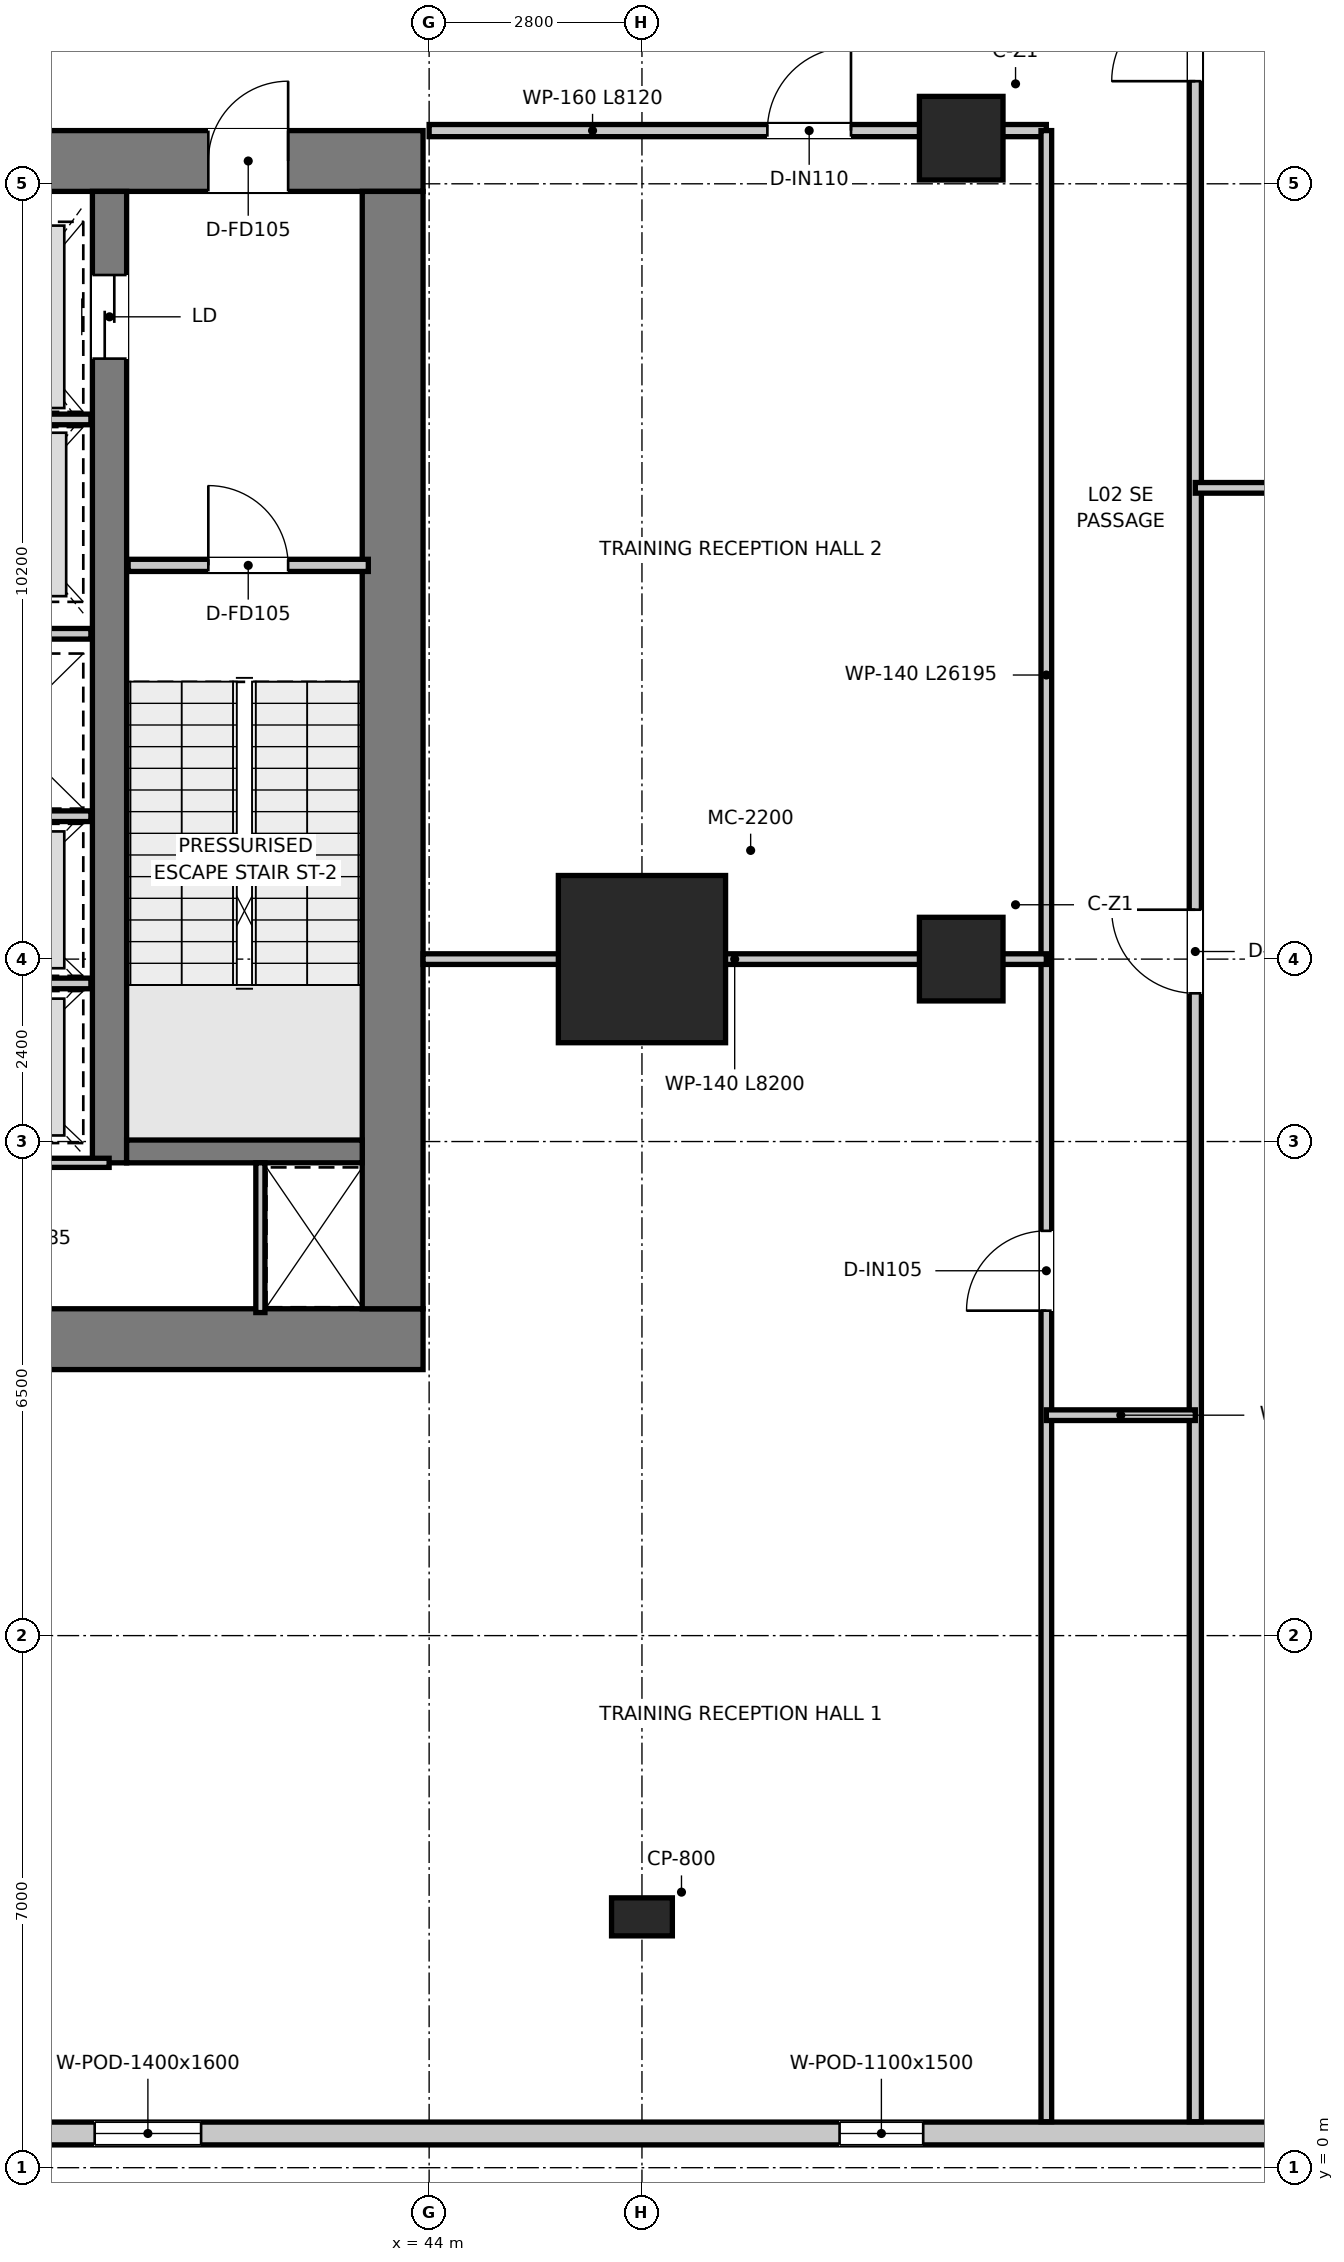
"""IFC4 building model, lengths in metres.
Left out: names, types, materials, properties, quantities, classifications, styles, units other than length and angle.
Written with IfcOpenShell. Run it as: python <this file> out.ifc"""

import sys

from ifc_helpers import new_model, si_unit, direction, frame, frame_2d, origin, origin_2d, place, context, subcontext, project, spatial, rectangle, extrude, source, transform, mapped, element, fill, save


model = new_model("IFC4")
c1 = context("Model", 3, precision=1e-05, world=origin(), true_north=direction((0.0, 1.0)))
c2 = subcontext(c1, "Body", "Model", "MODEL_VIEW")
j1 = project(units=[si_unit("LENGTHUNIT", "METRE"), si_unit("PLANEANGLEUNIT", "RADIAN")], contexts=[c1])
p1 = place(None, origin())
s1 = spatial("IfcSite", under=j1, at=p1, CompositionType="ELEMENT")
p2 = place(p1, origin())
s2 = spatial("IfcBuilding", under=s1, at=p2, CompositionType="ELEMENT")
p3 = place(p2, frame((0.0, 0.0, 10.4)))
s3 = spatial("IfcBuildingStorey", under=s2, at=p3, CompositionType="ELEMENT", Elevation=10.4)
p4 = place(p3, frame((28.08, 10.9, 0.0), z_axis=(0.0, 0.0, 1.0), x_axis=(1.0, 0.0, 0.0)))
e1 = element("IfcWall", 1, at=p4, inside=s3, PredefinedType="SHEAR", context=c2, shape_type="SweptSolid", body=[
    extrude(rectangle(XDim=15.84, YDim=0.8, at=frame_2d((7.92, 0.0))), origin(), (0.0, 0.0, 1.0), 5.0),
])
p5 = place(p3, frame((28.08, 26.4, 0.0), z_axis=(0.0, 0.0, 1.0), x_axis=(1.0, 0.0, 0.0)))
e2 = element("IfcWall", 2, at=p5, inside=s3, PredefinedType="SHEAR", context=c2, shape_type="SweptSolid", body=[
    extrude(rectangle(XDim=15.84, YDim=0.8, at=frame_2d((7.92, 0.0))), origin(), (0.0, 0.0, 1.0), 5.0),
])
p6 = place(p5, frame((7.22, 0.0, 0.0)))
e3 = element("IfcOpeningElement", 3, at=p6, cuts=e2, PredefinedType="OPENING", context=c2, shape_type="SweptSolid", body=[
    extrude(rectangle(XDim=1.4, YDim=2.2, at=frame_2d((0.7, 1.1))), frame((0.0, 0.41, 0.0), z_axis=(0.0, -1.0, 0.0), x_axis=(1.0, 0.0, 0.0)), (0.0, 0.0, 1.0), 0.82),
])
p7 = place(p5, frame((1.775, 0.0, 0.0)))
e4 = element("IfcOpeningElement", 4, at=p7, cuts=e2, PredefinedType="OPENING", context=c2, shape_type="SweptSolid", body=[
    extrude(rectangle(XDim=1.05, YDim=2.1, at=frame_2d((0.525, 1.05))), frame((0.0, 0.41, 0.0), z_axis=(0.0, -1.0, 0.0), x_axis=(1.0, 0.0, 0.0)), (0.0, 0.0, 1.0), 0.82),
])
p8 = place(p5, frame((13.015, 0.0, 0.0)))
e5 = element("IfcOpeningElement", 5, at=p8, cuts=e2, PredefinedType="OPENING", context=c2, shape_type="SweptSolid", body=[
    extrude(rectangle(XDim=1.05, YDim=2.1, at=frame_2d((0.525, 1.05))), frame((0.0, 0.41, 0.0), z_axis=(0.0, -1.0, 0.0), x_axis=(1.0, 0.0, 0.0)), (0.0, 0.0, 1.0), 0.82),
])
p9 = place(p3, frame((43.52, 11.3, 0.0), z_axis=(0.0, 0.0, 1.0), x_axis=(0.0, 1.0, 0.0)))
e6 = element("IfcWall", 6, at=p9, inside=s3, PredefinedType="SHEAR", context=c2, shape_type="SweptSolid", body=[
    extrude(rectangle(XDim=14.7, YDim=0.8, at=frame_2d((7.35, 0.0))), origin(), (0.0, 0.0, 1.0), 5.0),
])
p10 = place(p3, frame((39.795, 13.22, 0.0), z_axis=(0.0, 0.0, 1.0), x_axis=(0.0, 1.0, 0.0)))
e7 = element("IfcWall", 7, at=p10, inside=s3, PredefinedType="SHEAR", context=c2, shape_type="SweptSolid", body=[
    extrude(rectangle(XDim=12.78, YDim=0.45, at=frame_2d((6.39, 0.0))), origin(), (0.0, 0.0, 1.0), 5.0),
])
p11 = place(p10, frame((10.58, 0.0, 0.0)))
e8 = element("IfcOpeningElement", 8, at=p11, cuts=e7, PredefinedType="OPENING", context=c2, shape_type="SweptSolid", body=[
    extrude(rectangle(XDim=1.1, YDim=2.15, at=frame_2d((0.55, 1.075))), frame((0.0, 0.235, 0.0), z_axis=(0.0, -1.0, 0.0), x_axis=(1.0, 0.0, 0.0)), (0.0, 0.0, 1.0), 0.47),
])
p12 = place(p3, frame((40.02, 13.37, 0.0), z_axis=(0.0, 0.0, 1.0), x_axis=(1.0, 0.0, 0.0)))
e9 = element("IfcWall", 9, at=p12, inside=s3, PredefinedType="SHEAR", context=c2, shape_type="SweptSolid", body=[
    extrude(rectangle(XDim=3.1, YDim=0.3, at=frame_2d((1.55, 0.0))), origin(), (0.0, 0.0, 1.0), 5.0),
])
m1 = source(origin(), c2, "Body", "SweptSolid", [
    extrude(rectangle(XDim=2.2, YDim=2.2, at=origin_2d()), origin(), (0.0, 0.0, 1.0), 5.0),
])
p13 = place(p3, frame((46.8, 15.9, 0.0), z_axis=(0.0, 0.0, 1.0), x_axis=(1.0, 0.0, 0.0)))
e10 = element("IfcColumn", 10, at=p13, inside=s3, PredefinedType="USERDEFINED", context=c2, shape_type="MappedRepresentation", body=[
    mapped(m1, transform((0.0, 0.0, 0.0), x_axis=(1.0, 0.0, 0.0), y_axis=(0.0, 1.0, 0.0), z_axis=(0.0, 0.0, 1.0), scale=1.0)),
])
m2 = source(origin(), c2, "Body", "SweptSolid", [
    extrude(rectangle(XDim=1.1, YDim=1.1, at=origin_2d()), origin(), (0.0, 0.0, 1.0), 5.0),
])
for number, where, z_axis, x_axis in (
    (11, (51.0, 26.7, 0.0), (0.0, 0.0, 1.0), (1.0, 0.0, 0.0)),
    (12, (51.0, 15.9, 0.0), (0.0, 0.0, 1.0), (1.0, 0.0, 0.0)),
):
    element("IfcColumn", number, at=place(p3, frame(where, z_axis=z_axis, x_axis=x_axis)), inside=s3, PredefinedType="COLUMN", context=c2, shape_type="MappedRepresentation", body=[
        mapped(m2, transform((0.0, 0.0, 0.0), x_axis=(1.0, 0.0, 0.0), y_axis=(0.0, 1.0, 0.0), z_axis=(0.0, 0.0, 1.0), scale=1.0)),
    ])
m3 = source(origin(), c2, "Body", "SweptSolid", [
    extrude(rectangle(XDim=0.8, YDim=0.5, at=origin_2d()), origin(), (0.0, 0.0, 1.0), 5.0),
])
p14 = place(p3, frame((46.8, 3.3, 0.0), z_axis=(0.0, 0.0, 1.0), x_axis=(1.0, 0.0, 0.0)))
e13 = element("IfcColumn", 13, at=p14, inside=s3, PredefinedType="PILASTER", context=c2, shape_type="MappedRepresentation", body=[
    mapped(m3, transform((0.0, 0.0, 0.0), x_axis=(1.0, 0.0, 0.0), y_axis=(0.0, 1.0, 0.0), z_axis=(0.0, 0.0, 1.0), scale=1.0)),
])
p15 = place(p3, frame((72.0, 0.45, 0.0), z_axis=(0.0, 0.0, 1.0), x_axis=(-1.0, 0.0, 0.0)))
e14 = element("IfcWall", 14, at=p15, inside=s3, PredefinedType="SOLIDWALL", context=c2, shape_type="SweptSolid", body=[
    extrude(rectangle(XDim=72.0, YDim=0.3, at=frame_2d((36.0, 0.0))), origin(), (0.0, 0.0, 1.0), 4.7),
])
p16 = place(p15, frame((54.5, 0.0, 1.0)))
e15 = element("IfcOpeningElement", 15, at=p16, cuts=e14, PredefinedType="OPENING", context=c2, shape_type="SweptSolid", body=[
    extrude(rectangle(XDim=2.1, YDim=2.2, at=frame_2d((1.05, 1.1))), frame((0.0, 0.16, 0.0), z_axis=(0.0, -1.0, 0.0), x_axis=(1.0, 0.0, 0.0)), (0.0, 0.0, 1.0), 0.32),
])
p17 = place(p15, frame((45.5, 0.0, 1.05)))
e16 = element("IfcOpeningElement", 16, at=p17, cuts=e14, PredefinedType="OPENING", context=c2, shape_type="SweptSolid", body=[
    extrude(rectangle(XDim=1.6, YDim=2.0, at=frame_2d((0.8, 1.0))), frame((0.0, 0.16, 0.0), z_axis=(0.0, -1.0, 0.0), x_axis=(1.0, 0.0, 0.0)), (0.0, 0.0, 1.0), 0.32),
])
p18 = place(p15, frame((39.0, 0.0, 1.2)))
e17 = element("IfcOpeningElement", 17, at=p18, cuts=e14, PredefinedType="OPENING", context=c2, shape_type="SweptSolid", body=[
    extrude(rectangle(XDim=1.8, YDim=1.6, at=frame_2d((0.9, 0.8))), frame((0.0, 0.16, 0.0), z_axis=(0.0, -1.0, 0.0), x_axis=(1.0, 0.0, 0.0)), (0.0, 0.0, 1.0), 0.32),
])
p19 = place(p15, frame((31.0, 0.0, 1.2)))
e18 = element("IfcOpeningElement", 18, at=p19, cuts=e14, PredefinedType="OPENING", context=c2, shape_type="SweptSolid", body=[
    extrude(rectangle(XDim=1.4, YDim=1.6, at=frame_2d((0.7, 0.8))), frame((0.0, 0.16, 0.0), z_axis=(0.0, -1.0, 0.0), x_axis=(1.0, 0.0, 0.0)), (0.0, 0.0, 1.0), 0.32),
])
p20 = place(p15, frame((21.5, 0.0, 1.25)))
e19 = element("IfcOpeningElement", 19, at=p20, cuts=e14, PredefinedType="OPENING", context=c2, shape_type="SweptSolid", body=[
    extrude(rectangle(XDim=1.1, YDim=1.5, at=frame_2d((0.55, 0.75))), frame((0.0, 0.16, 0.0), z_axis=(0.0, -1.0, 0.0), x_axis=(1.0, 0.0, 0.0)), (0.0, 0.0, 1.0), 0.32),
])
p21 = place(p3, frame((40.04, 21.08, 0.0), z_axis=(0.0, 0.0, 1.0), x_axis=(1.0, 0.0, 0.0)))
e20 = element("IfcWall", 20, at=p21, inside=s3, PredefinedType="PARTITIONING", context=c2, shape_type="SweptSolid", body=[
    extrude(rectangle(XDim=3.16, YDim=0.16, at=frame_2d((1.58, 0.0))), origin(), (0.0, 0.0, 1.0), 4.7),
])
p22 = place(p21, frame((1.055, 0.0, 0.0)))
e21 = element("IfcOpeningElement", 21, at=p22, cuts=e20, PredefinedType="OPENING", context=c2, shape_type="SweptSolid", body=[
    extrude(rectangle(XDim=1.05, YDim=2.1, at=frame_2d((0.525, 1.05))), frame((0.0, 0.09, 0.0), z_axis=(0.0, -1.0, 0.0), x_axis=(1.0, 0.0, 0.0)), (0.0, 0.0, 1.0), 0.18),
])
p23 = place(p3, frame((37.28, 23.0, 0.0), z_axis=(0.0, 0.0, 1.0), x_axis=(1.0, 0.0, 0.0)))
e22 = element("IfcWall", 22, at=p23, inside=s3, PredefinedType="PARTITIONING", context=c2, shape_type="SweptSolid", body=[
    extrude(rectangle(XDim=2.27, YDim=0.14, at=frame_2d((1.135, 0.0))), origin(), (0.0, 0.0, 1.0), 3.5),
])
for number, where, z_axis, x_axis in (
    (23, (37.28, 17.78, 0.0), (0.0, 0.0, 1.0), (1.0, 0.0, 0.0)),
    (24, (37.28, 20.18, 0.0), (0.0, 0.0, 1.0), (1.0, 0.0, 0.0)),
    (25, (37.28, 15.58, 0.0), (0.0, 0.0, 1.0), (1.0, 0.0, 0.0)),
):
    element("IfcWall", number, at=place(p3, frame(where, z_axis=z_axis, x_axis=x_axis)), inside=s3, PredefinedType="PARTITIONING", context=c2, shape_type="SweptSolid", body=[
        extrude(rectangle(XDim=2.27, YDim=0.14, at=frame_2d((1.135, 0.0))), origin(), (0.0, 0.0, 1.0), 4.7),
    ])
p24 = place(p3, frame((41.78, 11.25, 0.0), z_axis=(0.0, 0.0, 1.0), x_axis=(0.0, 1.0, 0.0)))
e26 = element("IfcWall", 26, at=p24, inside=s3, PredefinedType="PARTITIONING", context=c2, shape_type="SweptSolid", body=[
    extrude(rectangle(XDim=1.97, YDim=0.12, at=frame_2d((0.985, 0.0))), origin(), (0.0, 0.0, 1.0), 4.7),
])
p25 = place(p3, frame((32.21, 13.22, 0.0), z_axis=(0.0, 0.0, 1.0), x_axis=(1.0, 0.0, 0.0)))
e27 = element("IfcWall", 27, at=p25, inside=s3, PredefinedType="PARTITIONING", context=c2, shape_type="SweptSolid", body=[
    extrude(rectangle(XDim=7.58, YDim=0.12, at=frame_2d((3.79, 0.0))), origin(), (0.0, 0.0, 1.0), 4.7),
])
p26 = place(p25, frame((3.365, 0.0, 0.0)))
e28 = element("IfcOpeningElement", 28, at=p26, cuts=e27, PredefinedType="OPENING", context=c2, shape_type="SweptSolid", body=[
    extrude(rectangle(XDim=0.85, YDim=2.1, at=frame_2d((0.425, 1.05))), frame((0.0, 0.07, 0.0), z_axis=(0.0, -1.0, 0.0), x_axis=(1.0, 0.0, 0.0)), (0.0, 0.0, 1.0), 0.14),
])
p27 = place(p3, frame((54.08, 0.605, 0.0), z_axis=(0.0, 0.0, 1.0), x_axis=(0.0, 1.0, 0.0)))
e29 = element("IfcWall", 29, at=p27, inside=s3, PredefinedType="PARTITIONING", context=c2, shape_type="SweptSolid", body=[
    extrude(rectangle(XDim=49.215, YDim=0.16, at=frame_2d((24.607, 0.0))), origin(), (0.0, 0.0, 1.0), 4.06),
])
p28 = place(p27, frame((14.845, 0.0, 0.0)))
e30 = element("IfcOpeningElement", 30, at=p28, cuts=e29, PredefinedType="OPENING", context=c2, shape_type="SweptSolid", body=[
    extrude(rectangle(XDim=1.1, YDim=2.15, at=frame_2d((0.55, 1.075))), frame((0.0, 0.09, 0.0), z_axis=(0.0, -1.0, 0.0), x_axis=(1.0, 0.0, 0.0)), (0.0, 0.0, 1.0), 0.18),
])
p29 = place(p27, frame((26.845, 0.0, 0.0)))
e31 = element("IfcOpeningElement", 31, at=p29, cuts=e29, PredefinedType="OPENING", context=c2, shape_type="SweptSolid", body=[
    extrude(rectangle(XDim=1.1, YDim=2.15, at=frame_2d((0.55, 1.075))), frame((0.0, 0.09, 0.0), z_axis=(0.0, -1.0, 0.0), x_axis=(1.0, 0.0, 0.0)), (0.0, 0.0, 1.0), 0.18),
])
p30 = place(p3, frame((44.0, 26.8, 0.0), z_axis=(0.0, 0.0, 1.0), x_axis=(1.0, 0.0, 0.0)))
e32 = element("IfcWall", 32, at=p30, inside=s3, PredefinedType="PARTITIONING", context=c2, shape_type="SweptSolid", body=[
    extrude(rectangle(XDim=8.12, YDim=0.16, at=frame_2d((4.06, 0.0))), origin(), (0.0, 0.0, 1.0), 3.9),
])
p31 = place(p30, frame((4.45, 0.0, 0.0)))
e33 = element("IfcOpeningElement", 33, at=p31, cuts=e32, PredefinedType="OPENING", context=c2, shape_type="SweptSolid", body=[
    extrude(rectangle(XDim=1.1, YDim=2.15, at=frame_2d((0.55, 1.075))), frame((0.0, 0.09, 0.0), z_axis=(0.0, -1.0, 0.0), x_axis=(1.0, 0.0, 0.0)), (0.0, 0.0, 1.0), 0.18),
])
p32 = place(p3, frame((52.12, 0.605, 0.0), z_axis=(0.0, 0.0, 1.0), x_axis=(0.0, 1.0, 0.0)))
e34 = element("IfcWall", 34, at=p32, inside=s3, PredefinedType="PARTITIONING", context=c2, shape_type="SweptSolid", body=[
    extrude(rectangle(XDim=26.195, YDim=0.14, at=frame_2d((13.098, 0.0))), origin(), (0.0, 0.0, 1.0), 4.06),
])
p33 = place(p32, frame((10.67, 0.0, 0.0)))
e35 = element("IfcOpeningElement", 35, at=p33, cuts=e34, PredefinedType="OPENING", context=c2, shape_type="SweptSolid", body=[
    extrude(rectangle(XDim=1.05, YDim=2.15, at=frame_2d((0.525, 1.075))), frame((0.0, 0.08, 0.0), z_axis=(0.0, -1.0, 0.0), x_axis=(1.0, 0.0, 0.0)), (0.0, 0.0, 1.0), 0.16),
])
p34 = place(p3, frame((52.12, 9.9, 0.0), z_axis=(0.0, 0.0, 1.0), x_axis=(1.0, 0.0, 0.0)))
e36 = element("IfcWall", 36, at=p34, inside=s3, PredefinedType="PARTITIONING", context=c2, shape_type="SweptSolid", body=[
    extrude(rectangle(XDim=1.96, YDim=0.14, at=frame_2d((0.98, 0.0))), origin(), (0.0, 0.0, 1.0), 4.7),
])
p35 = place(p3, frame((43.92, 15.9, 0.0), z_axis=(0.0, 0.0, 1.0), x_axis=(1.0, 0.0, 0.0)))
e37 = element("IfcWall", 37, at=p35, inside=s3, PredefinedType="PARTITIONING", context=c2, shape_type="SweptSolid", body=[
    extrude(rectangle(XDim=8.2, YDim=0.14, at=frame_2d((4.1, 0.0))), origin(), (0.0, 0.0, 1.0), 3.9),
])
p36 = place(p3, frame((54.08, 22.1, 0.0), z_axis=(0.0, 0.0, 1.0), x_axis=(1.0, 0.0, 0.0)))
e38 = element("IfcWall", 38, at=p36, inside=s3, PredefinedType="PARTITIONING", context=c2, shape_type="SweptSolid", body=[
    extrude(rectangle(XDim=17.615, YDim=0.14, at=frame_2d((8.808, 0.0))), origin(), (0.0, 0.0, 1.0), 4.01),
])
p37 = place(p19, origin())
e39 = element("IfcWindow", 39, at=p37, inside=s3, PartitioningType="SINGLE_PANEL", PredefinedType="WINDOW", context=c2, shape_type="SweptSolid", body=[
    extrude(rectangle(XDim=1.4, YDim=1.6, at=frame_2d((0.7, 0.8))), frame((0.0, 0.03, 0.0), z_axis=(0.0, -1.0, 0.0), x_axis=(1.0, 0.0, 0.0)), (0.0, 0.0, 1.0), 0.06),
])
fill(e18, e39)
p38 = place(p20, origin())
e40 = element("IfcWindow", 40, at=p38, inside=s3, PartitioningType="SINGLE_PANEL", PredefinedType="WINDOW", context=c2, shape_type="SweptSolid", body=[
    extrude(rectangle(XDim=1.1, YDim=1.5, at=frame_2d((0.55, 0.75))), frame((0.0, 0.03, 0.0), z_axis=(0.0, -1.0, 0.0), x_axis=(1.0, 0.0, 0.0)), (0.0, 0.0, 1.0), 0.06),
])
fill(e19, e40)
p39 = place(p22, origin())
e41 = element("IfcDoor", 41, at=p39, inside=s3, OperationType="SINGLE_SWING_LEFT", PredefinedType="DOOR", context=c2, shape_type="SweptSolid", body=[
    extrude(rectangle(XDim=1.05, YDim=2.1, at=frame_2d((0.525, 1.05))), frame((0.0, 0.025, 0.0), z_axis=(0.0, -1.0, 0.0), x_axis=(1.0, 0.0, 0.0)), (0.0, 0.0, 1.0), 0.05),
])
fill(e21, e41)
p40 = place(p8, origin())
e42 = element("IfcDoor", 42, at=p40, inside=s3, OperationType="SINGLE_SWING_RIGHT", PredefinedType="DOOR", context=c2, shape_type="SweptSolid", body=[
    extrude(rectangle(XDim=1.05, YDim=2.1, at=frame_2d((0.525, 1.05))), frame((0.0, 0.025, 0.0), z_axis=(0.0, -1.0, 0.0), x_axis=(1.0, 0.0, 0.0)), (0.0, 0.0, 1.0), 0.05),
])
fill(e5, e42)
p41 = place(p11, origin())
e43 = element("IfcDoor", 43, at=p41, inside=s3, OperationType="DOUBLE_DOOR_SLIDING", PredefinedType="DOOR", context=c2, shape_type="SweptSolid", body=[
    extrude(rectangle(XDim=1.1, YDim=2.15, at=frame_2d((0.55, 1.075))), frame((0.0, 0.025, 0.0), z_axis=(0.0, -1.0, 0.0), x_axis=(1.0, 0.0, 0.0)), (0.0, 0.0, 1.0), 0.05),
])
fill(e8, e43)
p42 = place(p31, origin())
e44 = element("IfcDoor", 44, at=p42, inside=s3, OperationType="SINGLE_SWING_RIGHT", PredefinedType="DOOR", context=c2, shape_type="SweptSolid", body=[
    extrude(rectangle(XDim=1.1, YDim=2.15, at=frame_2d((0.55, 1.075))), frame((0.0, 0.025, 0.0), z_axis=(0.0, -1.0, 0.0), x_axis=(1.0, 0.0, 0.0)), (0.0, 0.0, 1.0), 0.05),
])
fill(e33, e44)
p43 = place(p33, origin())
e45 = element("IfcDoor", 45, at=p43, inside=s3, OperationType="SINGLE_SWING_LEFT", PredefinedType="DOOR", context=c2, shape_type="SweptSolid", body=[
    extrude(rectangle(XDim=1.05, YDim=2.15, at=frame_2d((0.525, 1.075))), frame((0.0, 0.025, 0.0), z_axis=(0.0, -1.0, 0.0), x_axis=(1.0, 0.0, 0.0)), (0.0, 0.0, 1.0), 0.05),
])
fill(e35, e45)
p44 = place(p28, origin())
e46 = element("IfcDoor", 46, at=p44, inside=s3, OperationType="SINGLE_SWING_RIGHT", PredefinedType="DOOR", context=c2, shape_type="SweptSolid", body=[
    extrude(rectangle(XDim=1.1, YDim=2.15, at=frame_2d((0.55, 1.075))), frame((0.0, 0.025, 0.0), z_axis=(0.0, -1.0, 0.0), x_axis=(1.0, 0.0, 0.0)), (0.0, 0.0, 1.0), 0.05),
])
fill(e30, e46)
p45 = place(p29, origin())
e47 = element("IfcDoor", 47, at=p45, inside=s3, OperationType="SINGLE_SWING_LEFT", PredefinedType="DOOR", context=c2, shape_type="SweptSolid", body=[
    extrude(rectangle(XDim=1.1, YDim=2.15, at=frame_2d((0.55, 1.075))), frame((0.0, 0.025, 0.0), z_axis=(0.0, -1.0, 0.0), x_axis=(1.0, 0.0, 0.0)), (0.0, 0.0, 1.0), 0.05),
])
fill(e31, e47)
save(model, sys.argv[1])
